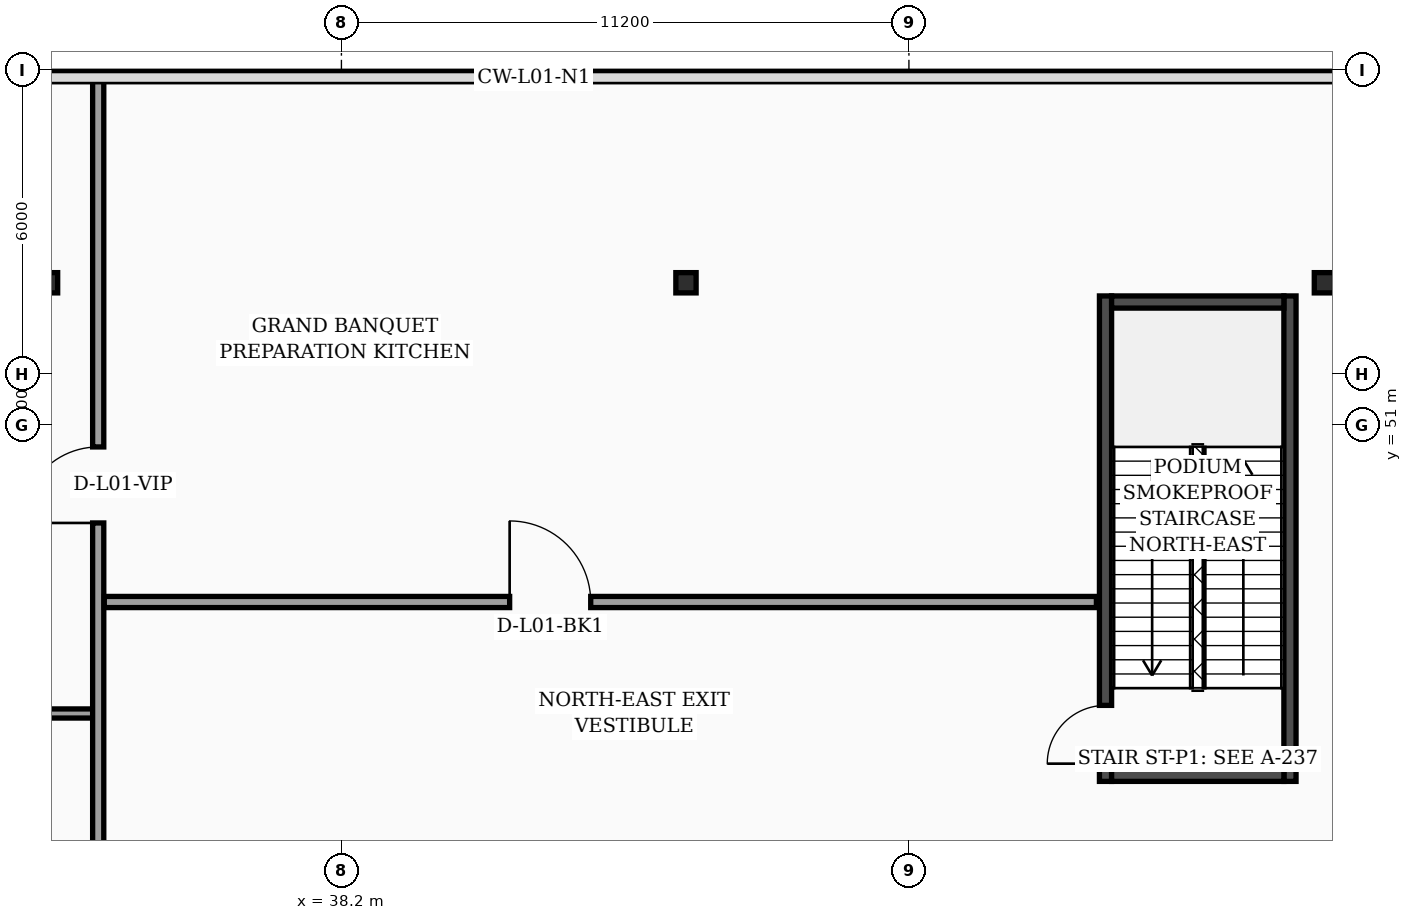
"""IFC4 building model, lengths in metres.
Left out: names, types, materials, properties, quantities, classifications, styles, units other than length and angle.
Written with IfcOpenShell. Run it as: python <this file> out.ifc"""

import sys

from ifc_helpers import new_model, si_unit, direction, frame, frame_2d, origin, origin_2d, place, context, subcontext, project, spatial, rectangle, i_section, extrude, element, fill, save


model = new_model("IFC4")
c1 = context("Model", 3, precision=1e-05, world=origin(), true_north=direction((0.0, 1.0)))
c2 = subcontext(c1, "Body", "Model", "MODEL_VIEW")
j1 = project(units=[si_unit("LENGTHUNIT", "METRE"), si_unit("PLANEANGLEUNIT", "RADIAN")], contexts=[c1])
p1 = place(None, origin())
s1 = spatial("IfcSite", under=j1, at=p1, CompositionType="ELEMENT")
p2 = place(p1, origin())
s2 = spatial("IfcBuilding", under=s1, at=p2, CompositionType="ELEMENT")
p3 = place(p2, frame((0.0, 0.0, 6.0)))
s3 = spatial("IfcBuildingStorey", under=s2, at=p3, CompositionType="ELEMENT", Elevation=6.0)
p4 = place(p3, frame((53.28, 43.96, 0.0), z_axis=(0.0, 0.0, 1.0), x_axis=(0.0, 1.0, 0.0)))
e1 = element("IfcWall", 1, at=p4, inside=s3, PredefinedType="SOLIDWALL", context=c2, shape_type="SweptSolid", body=[
    extrude(rectangle(XDim=9.58, YDim=0.24, at=frame_2d((4.79, 0.0))), origin(), (0.0, 0.0, 1.0), 5.68),
])
p5 = place(p4, frame((0.35, 0.0, 0.0)))
e2 = element("IfcOpeningElement", 2, at=p5, cuts=e1, PredefinedType="OPENING", context=c2, shape_type="SweptSolid", body=[
    extrude(rectangle(XDim=1.15, YDim=2.2, at=frame_2d((0.575, 1.1))), frame((0.0, 0.13, 0.0), z_axis=(0.0, -1.0, 0.0), x_axis=(1.0, 0.0, 0.0)), (0.0, 0.0, 1.0), 0.26),
])
p6 = place(p3, frame((56.92, 43.96, 0.0), z_axis=(0.0, 0.0, 1.0), x_axis=(0.0, 1.0, 0.0)))
e3 = element("IfcWall", 3, at=p6, inside=s3, PredefinedType="SOLIDWALL", context=c2, shape_type="SweptSolid", body=[
    extrude(rectangle(XDim=9.58, YDim=0.24, at=frame_2d((4.79, 0.0))), origin(), (0.0, 0.0, 1.0), 5.68),
])
for number, where, z_axis, x_axis in (
    (4, (53.4, 44.08, 0.0), (0.0, 0.0, 1.0), (1.0, 0.0, 0.0)),
    (5, (53.4, 53.42, 0.0), (0.0, 0.0, 1.0), (1.0, 0.0, 0.0)),
):
    element("IfcWall", number, at=place(p3, frame(where, z_axis=z_axis, x_axis=x_axis)), inside=s3, PredefinedType="SOLIDWALL", context=c2, shape_type="SweptSolid", body=[
        extrude(rectangle(XDim=3.4, YDim=0.24, at=frame_2d((1.7, 0.0))), origin(), (0.0, 0.0, 1.0), 5.68),
    ])
for number, where, z_axis, x_axis in (
    (6, (32.4, 53.8, 0.0), (0.0, 0.0, 1.0), (1.0, 0.0, 0.0)),
    (7, (45.0, 53.8, 0.0), (0.0, 0.0, 1.0), (1.0, 0.0, 0.0)),
    (8, (57.6, 53.8, 0.0), (0.0, 0.0, 1.0), (1.0, 0.0, 0.0)),
):
    element("IfcColumn", number, at=place(p3, frame(where, z_axis=z_axis, x_axis=x_axis)), inside=s3, PredefinedType="PILASTER", context=c2, shape_type="SweptSolid", body=[
        extrude(i_section(OverallWidth=0.4, OverallDepth=0.4, WebThickness=0.013, FlangeThickness=0.021, FilletRadius=0.022, at=origin_2d()), origin(), (0.0, 0.0, 1.0), 5.68),
    ])
p7 = place(p3, frame((15.2, 45.3, 0.0), z_axis=(0.0, 0.0, 1.0), x_axis=(1.0, 0.0, 0.0)))
e9 = element("IfcWall", 9, at=p7, inside=s3, PredefinedType="PARTITIONING", context=c2, shape_type="SweptSolid", body=[
    extrude(rectangle(XDim=18.1, YDim=0.18, at=frame_2d((9.05, 0.0))), origin(), (0.0, 0.0, 1.0), 4.88),
])
p8 = place(p3, frame((33.4, 0.06, 0.0), z_axis=(0.0, 0.0, 1.0), x_axis=(0.0, 1.0, 0.0)))
e10 = element("IfcWall", 10, at=p8, inside=s3, PredefinedType="SOLIDWALL", context=c2, shape_type="SweptSolid", body=[
    extrude(rectangle(XDim=57.88, YDim=0.22, at=frame_2d((28.94, 0.0))), origin(), (0.0, 0.0, 1.0), 4.88),
])
p9 = place(p8, frame((18.0, 0.0, 0.0)))
e11 = element("IfcOpeningElement", 11, at=p9, cuts=e10, PredefinedType="OPENING", context=c2, shape_type="SweptSolid", body=[
    extrude(rectangle(XDim=1.8, YDim=2.4, at=frame_2d((0.9, 1.2))), frame((0.0, 0.12, 0.0), z_axis=(0.0, -1.0, 0.0), x_axis=(1.0, 0.0, 0.0)), (0.0, 0.0, 1.0), 0.24),
])
p10 = place(p8, frame((29.0, 0.0, 0.0)))
e12 = element("IfcOpeningElement", 12, at=p10, cuts=e10, PredefinedType="OPENING", context=c2, shape_type="SweptSolid", body=[
    extrude(rectangle(XDim=1.6, YDim=2.35, at=frame_2d((0.8, 1.175))), frame((0.0, 0.12, 0.0), z_axis=(0.0, -1.0, 0.0), x_axis=(1.0, 0.0, 0.0)), (0.0, 0.0, 1.0), 0.24),
])
p11 = place(p8, frame((49.0, 0.0, 0.0)))
e13 = element("IfcOpeningElement", 13, at=p11, cuts=e10, PredefinedType="OPENING", context=c2, shape_type="SweptSolid", body=[
    extrude(rectangle(XDim=1.5, YDim=2.22, at=frame_2d((0.75, 1.11))), frame((0.0, 0.12, 0.0), z_axis=(0.0, -1.0, 0.0), x_axis=(1.0, 0.0, 0.0)), (0.0, 0.0, 1.0), 0.24),
])
p12 = place(p3, frame((33.52, 47.5, 0.0), z_axis=(0.0, 0.0, 1.0), x_axis=(1.0, 0.0, 0.0)))
e14 = element("IfcWall", 14, at=p12, inside=s3, PredefinedType="SOLIDWALL", context=c2, shape_type="SweptSolid", body=[
    extrude(rectangle(XDim=19.58, YDim=0.22, at=frame_2d((9.79, 0.0))), origin(), (0.0, 0.0, 1.0), 4.88),
])
p13 = place(p12, frame((8.0, 0.0, 0.0)))
e15 = element("IfcOpeningElement", 15, at=p13, cuts=e14, PredefinedType="OPENING", context=c2, shape_type="SweptSolid", body=[
    extrude(rectangle(XDim=1.6, YDim=2.35, at=frame_2d((0.8, 1.175))), frame((0.0, 0.12, 0.0), z_axis=(0.0, -1.0, 0.0), x_axis=(1.0, 0.0, 0.0)), (0.0, 0.0, 1.0), 0.24),
])
p14 = place(p11, origin())
e16 = element("IfcDoor", 16, at=p14, inside=s3, OperationType="SINGLE_SWING_LEFT", PredefinedType="DOOR", context=c2, shape_type="SweptSolid", body=[
    extrude(rectangle(XDim=1.5, YDim=2.22, at=frame_2d((0.75, 1.11))), frame((0.0, 0.025, 0.0), z_axis=(0.0, -1.0, 0.0), x_axis=(1.0, 0.0, 0.0)), (0.0, 0.0, 1.0), 0.05),
])
fill(e13, e16)
p15 = place(p13, origin())
e17 = element("IfcDoor", 17, at=p15, inside=s3, OperationType="SINGLE_SWING_LEFT", PredefinedType="DOOR", context=c2, shape_type="SweptSolid", body=[
    extrude(rectangle(XDim=1.6, YDim=2.35, at=frame_2d((0.8, 1.175))), frame((0.0, 0.025, 0.0), z_axis=(0.0, -1.0, 0.0), x_axis=(1.0, 0.0, 0.0)), (0.0, 0.0, 1.0), 0.05),
])
fill(e15, e17)
p16 = place(p5, origin())
e18 = element("IfcDoor", 18, at=p16, inside=s3, OperationType="SINGLE_SWING_LEFT", PredefinedType="DOOR", context=c2, shape_type="SweptSolid", body=[
    extrude(rectangle(XDim=1.15, YDim=2.2, at=frame_2d((0.575, 1.1))), frame((0.0, 0.025, 0.0), z_axis=(0.0, -1.0, 0.0), x_axis=(1.0, 0.0, 0.0)), (0.0, 0.0, 1.0), 0.05),
])
fill(e2, e18)
save(model, sys.argv[1])
